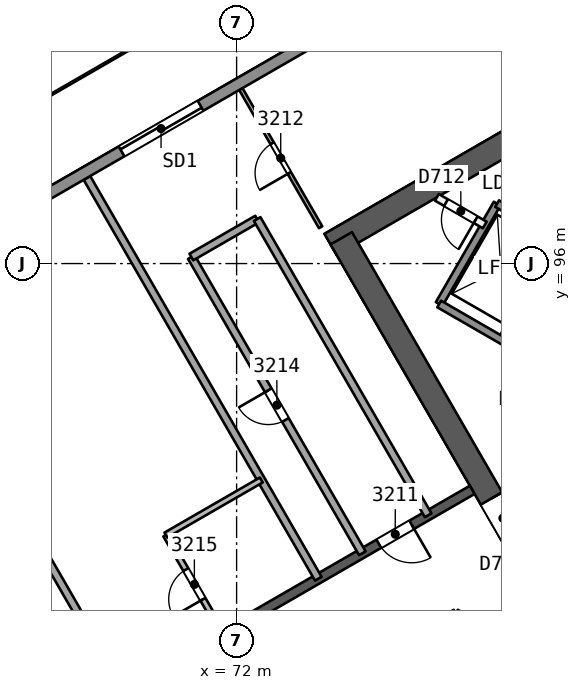
"""IFC4 building model, lengths in metres.
Left out: names, types, materials, properties, quantities, classifications, styles, units other than length and angle.
Written with IfcOpenShell. Run it as: python <this file> out.ifc"""

import sys

from ifc_helpers import new_model, si_unit, direction, frame, frame_2d, origin, place, context, subcontext, project, spatial, rectangle, extrude, element, fill, save


model = new_model("IFC4")
c1 = context("Model", 3, precision=1e-05, world=origin(), true_north=direction((0.0, 1.0)))
c2 = subcontext(c1, "Body", "Model", "MODEL_VIEW")
j1 = project(units=[si_unit("LENGTHUNIT", "METRE"), si_unit("PLANEANGLEUNIT", "RADIAN")], contexts=[c1])
p1 = place(None, origin())
s1 = spatial("IfcSite", under=j1, at=p1, CompositionType="ELEMENT")
p2 = place(p1, origin())
s2 = spatial("IfcBuilding", under=s1, at=p2, CompositionType="ELEMENT")
p3 = place(p2, frame((0.0, 0.0, 132.7)))
s3 = spatial("IfcBuildingStorey", under=s2, at=p3, CompositionType="ELEMENT", Elevation=132.7)
p4 = place(p3, frame((86.723, 103.575, 0.0), z_axis=(0.0, 0.0, 1.0), x_axis=(-0.866031824457, -0.499988878904, 0.0)))
e1 = element("IfcWall", 1, at=p4, inside=s3, PredefinedType="SHEAR", context=c2, shape_type="SweptSolid", body=[
    extrude(rectangle(XDim=14.146, YDim=0.65, at=frame_2d((7.073, 0.0))), origin(), (0.0, 0.0, 1.0), 3.7),
])
p5 = place(p3, frame((74.754, 96.665, 0.0), z_axis=(0.0, 0.0, 1.0), x_axis=(0.500011799426, -0.866018591275, 0.0)))
e2 = element("IfcWall", 2, at=p5, inside=s3, PredefinedType="SHEAR", context=c2, shape_type="SweptSolid", body=[
    extrude(rectangle(XDim=10.055, YDim=0.65, at=frame_2d((5.027, 0.0))), origin(), (0.0, 0.0, 1.0), 3.7),
])
p6 = place(p5, frame((7.905, 0.0, 0.0)))
e3 = element("IfcOpeningElement", 3, at=p6, cuts=e2, PredefinedType="OPENING", context=c2, shape_type="SweptSolid", body=[
    extrude(rectangle(XDim=1.2, YDim=2.1, at=frame_2d((0.6, 1.05))), frame((0.0, 0.335, 0.0), z_axis=(0.0, -1.0, 0.0), x_axis=(1.0, 0.0, 0.0)), (0.0, 0.0, 1.0), 0.671),
])
p7 = place(p3, frame((78.2, 90.046, 0.0), z_axis=(0.0, 0.0, 1.0), x_axis=(-0.866026492143, -0.499998114903, 0.0)))
e4 = element("IfcWall", 4, at=p7, inside=s3, PredefinedType="SHEAR", context=c2, shape_type="SweptSolid", body=[
    extrude(rectangle(XDim=15.588, YDim=0.25, at=frame_2d((7.794, 0.0))), origin(), (0.0, 0.0, 1.0), 3.25),
])
p8 = place(p7, frame((1.838, 0.0, 0.0)))
e5 = element("IfcOpeningElement", 5, at=p8, cuts=e4, PredefinedType="OPENING", context=c2, shape_type="SweptSolid", body=[
    extrude(rectangle(XDim=1.0, YDim=2.1, at=frame_2d((0.5, 1.05))), frame((0.0, 0.135, 0.0), z_axis=(0.0, -1.0, 0.0), x_axis=(1.0, 0.0, 0.0)), (0.0, 0.0, 1.0), 0.271),
])
p9 = place(p7, frame((8.538, 0.0, 0.0)))
e6 = element("IfcOpeningElement", 6, at=p9, cuts=e4, PredefinedType="OPENING", context=c2, shape_type="SweptSolid", body=[
    extrude(rectangle(XDim=1.1, YDim=2.1, at=frame_2d((0.55, 1.05))), frame((0.0, 0.135, 0.0), z_axis=(0.0, -1.0, 0.0), x_axis=(1.0, 0.0, 0.0)), (0.0, 0.0, 1.0), 0.271),
])
p10 = place(p7, frame((12.594, 0.0, 0.0)))
e7 = element("IfcOpeningElement", 7, at=p10, cuts=e4, PredefinedType="OPENING", context=c2, shape_type="SweptSolid", body=[
    extrude(rectangle(XDim=1.0, YDim=2.1, at=frame_2d((0.5, 1.05))), frame((0.0, 0.135, 0.0), z_axis=(0.0, -1.0, 0.0), x_axis=(1.0, 0.0, 0.0)), (0.0, 0.0, 1.0), 0.271),
])
p11 = place(p3, frame((74.21, 96.956, 0.0), z_axis=(0.0, 0.0, 1.0), x_axis=(-0.49999760543, 0.866026786286, 0.0)))
e8 = element("IfcWall", 8, at=p11, inside=s3, PredefinedType="PARTITIONING", context=c2, shape_type="SweptSolid", body=[
    extrude(rectangle(XDim=4.199, YDim=0.1, at=frame_2d((2.099, 0.0))), origin(), (0.0, 0.0, 1.0), 3.25),
])
p12 = place(p11, frame((1.649, 0.0, 0.0)))
e9 = element("IfcOpeningElement", 9, at=p12, cuts=e8, PredefinedType="OPENING", context=c2, shape_type="SweptSolid", body=[
    extrude(rectangle(XDim=0.9, YDim=2.1, at=frame_2d((0.45, 1.05))), frame((0.0, 0.061, 0.0), z_axis=(0.0, -1.0, 0.0), x_axis=(1.0, 0.0, 0.0)), (0.0, 0.0, 1.0), 0.121),
])
p13 = place(p3, frame((75.309, 88.377, 0.0), z_axis=(0.0, 0.0, 1.0), x_axis=(-0.5000018851, 0.866024315419, 0.0)))
e10 = element("IfcWall", 10, at=p13, inside=s3, PredefinedType="PARTITIONING", context=c2, shape_type="SweptSolid", body=[
    extrude(rectangle(XDim=9.0, YDim=0.2, at=frame_2d((4.5, 0.0))), origin(), (0.0, 0.0, 1.0), 3.25),
])
p14 = place(p13, frame((4.05, 0.0, 0.0)))
e11 = element("IfcOpeningElement", 11, at=p14, cuts=e10, PredefinedType="OPENING", context=c2, shape_type="SweptSolid", body=[
    extrude(rectangle(XDim=0.9, YDim=2.1, at=frame_2d((0.45, 1.05))), frame((0.0, 0.11, 0.0), z_axis=(0.0, -1.0, 0.0), x_axis=(1.0, 0.0, 0.0)), (0.0, 0.0, 1.0), 0.221),
])
p15 = place(p3, frame((70.809, 96.171, 0.0), z_axis=(0.0, 0.0, 1.0), x_axis=(0.866010750942, 0.50002537861, 0.0)))
e12 = element("IfcWall", 12, at=p15, inside=s3, PredefinedType="PARTITIONING", context=c2, shape_type="SweptSolid", body=[
    extrude(rectangle(XDim=2.0, YDim=0.2, at=frame_2d((1.0, 0.0))), origin(), (0.0, 0.0, 1.0), 3.25),
])
p16 = place(p3, frame((72.541, 97.171, 0.0), z_axis=(0.0, 0.0, 1.0), x_axis=(0.5000018851, -0.866024315419, 0.0)))
e13 = element("IfcWall", 13, at=p16, inside=s3, PredefinedType="PARTITIONING", context=c2, shape_type="SweptSolid", body=[
    extrude(rectangle(XDim=9.0, YDim=0.2, at=frame_2d((4.5, 0.0))), origin(), (0.0, 0.0, 1.0), 3.25),
])
p17 = place(p3, frame((68.061, 98.254, 0.0), z_axis=(0.0, 0.0, 1.0), x_axis=(0.499987977232, -0.866032345022, 0.0)))
e14 = element("IfcWall", 14, at=p17, inside=s3, PredefinedType="PARTITIONING", context=c2, shape_type="SweptSolid", body=[
    extrude(rectangle(XDim=12.177, YDim=0.2, at=frame_2d((6.089, 0.0))), origin(), (0.0, 0.0, 1.0), 3.25),
])
p18 = place(p3, frame((71.638, 86.258, 0.0), z_axis=(0.0, 0.0, 1.0), x_axis=(-0.499990139034, 0.866031096941, 0.0)))
e15 = element("IfcWall", 15, at=p18, inside=s3, PredefinedType="PARTITIONING", context=c2, shape_type="SweptSolid", body=[
    extrude(rectangle(XDim=3.0, YDim=0.15, at=frame_2d((1.5, 0.0))), origin(), (0.0, 0.0, 1.0), 3.25),
])
p19 = place(p18, frame((1.05, 0.0, 0.0)))
e16 = element("IfcOpeningElement", 16, at=p19, cuts=e15, PredefinedType="OPENING", context=c2, shape_type="SweptSolid", body=[
    extrude(rectangle(XDim=0.9, YDim=2.1, at=frame_2d((0.45, 1.05))), frame((0.0, 0.085, 0.0), z_axis=(0.0, -1.0, 0.0), x_axis=(1.0, 0.0, 0.0)), (0.0, 0.0, 1.0), 0.171),
])
p20 = place(p3, frame((70.138, 88.856, 0.0), z_axis=(0.0, 0.0, 1.0), x_axis=(0.866032775405, 0.499987231761, 0.0)))
e17 = element("IfcWall", 17, at=p20, inside=s3, PredefinedType="PARTITIONING", context=c2, shape_type="SweptSolid", body=[
    extrude(rectangle(XDim=2.9, YDim=0.15, at=frame_2d((1.45, 0.0))), origin(), (0.0, 0.0, 1.0), 3.25),
])
p21 = place(p3, frame((62.931, 95.292, 0.0), z_axis=(0.0, 0.0, 1.0), x_axis=(0.500003013575, -0.866023663889, 0.0)))
e18 = element("IfcWall", 18, at=p21, inside=s3, PredefinedType="PARTITIONING", context=c2, shape_type="SweptSolid", body=[
    extrude(rectangle(XDim=12.178, YDim=0.2, at=frame_2d((6.089, 0.0))), origin(), (0.0, 0.0, 1.0), 3.25),
])
p22 = place(p3, frame((63.226, 91.793, 0.0), z_axis=(0.0, 0.0, 1.0), x_axis=(0.5000018851, -0.866024315419, 0.0)))
e19 = element("IfcWall", 19, at=p22, inside=s3, PredefinedType="PARTITIONING", context=c2, shape_type="SweptSolid", body=[
    extrude(rectangle(XDim=9.0, YDim=0.2, at=frame_2d((4.5, 0.0))), origin(), (0.0, 0.0, 1.0), 3.25),
])
p23 = place(p22, frame((4.05, 0.0, 0.0)))
e20 = element("IfcOpeningElement", 20, at=p23, cuts=e19, PredefinedType="OPENING", context=c2, shape_type="SweptSolid", body=[
    extrude(rectangle(XDim=0.9, YDim=2.1, at=frame_2d((0.45, 1.05))), frame((0.0, 0.11, 0.0), z_axis=(0.0, -1.0, 0.0), x_axis=(1.0, 0.0, 0.0)), (0.0, 0.0, 1.0), 0.221),
])
p24 = place(p3, frame((41.097, 82.858, 0.0), z_axis=(0.0, 0.0, 1.0), x_axis=(0.866026276916, 0.499998487688, 0.0)))
e21 = element("IfcWall", 21, at=p24, inside=s3, PredefinedType="SOLIDWALL", context=c2, shape_type="SweptSolid", body=[
    extrude(rectangle(XDim=55.864, YDim=0.3, at=frame_2d((27.932, 0.0))), origin(), (0.0, 0.0, 1.0), 3.25),
])
p25 = place(p24, frame((26.888, 0.0, 0.0)))
e22 = element("IfcOpeningElement", 22, at=p25, cuts=e21, PredefinedType="OPENING", context=c2, shape_type="SweptSolid", body=[
    extrude(rectangle(XDim=2.4, YDim=2.4, at=frame_2d((1.2, 1.2))), frame((0.0, 0.161, 0.0), z_axis=(0.0, -1.0, 0.0), x_axis=(1.0, 0.0, 0.0)), (0.0, 0.0, 1.0), 0.321),
])
p26 = place(p24, frame((32.188, 0.0, 0.0)))
e23 = element("IfcOpeningElement", 23, at=p26, cuts=e21, PredefinedType="OPENING", context=c2, shape_type="SweptSolid", body=[
    extrude(rectangle(XDim=2.4, YDim=2.4, at=frame_2d((1.2, 1.2))), frame((0.0, 0.161, 0.0), z_axis=(0.0, -1.0, 0.0), x_axis=(1.0, 0.0, 0.0)), (0.0, 0.0, 1.0), 0.321),
])
p27 = place(p24, frame((43.384, 0.0, 0.0)))
e24 = element("IfcOpeningElement", 24, at=p27, cuts=e21, PredefinedType="OPENING", context=c2, shape_type="SweptSolid", body=[
    extrude(rectangle(XDim=2.4, YDim=2.4, at=frame_2d((1.2, 1.2))), frame((0.0, 0.161, 0.0), z_axis=(0.0, -1.0, 0.0), x_axis=(1.0, 0.0, 0.0)), (0.0, 0.0, 1.0), 0.321),
])
p28 = place(p24, frame((21.432, 0.0, 0.0)))
e25 = element("IfcOpeningElement", 25, at=p28, cuts=e21, PredefinedType="OPENING", context=c2, shape_type="SweptSolid", body=[
    extrude(rectangle(XDim=2.4, YDim=2.4, at=frame_2d((1.2, 1.2))), frame((0.0, 0.161, 0.0), z_axis=(0.0, -1.0, 0.0), x_axis=(1.0, 0.0, 0.0)), (0.0, 0.0, 1.0), 0.321),
])
p29 = place(p24, frame((10.029, 0.0, 0.0)))
e26 = element("IfcOpeningElement", 26, at=p29, cuts=e21, PredefinedType="OPENING", context=c2, shape_type="SweptSolid", body=[
    extrude(rectangle(XDim=2.4, YDim=2.4, at=frame_2d((1.2, 1.2))), frame((0.0, 0.161, 0.0), z_axis=(0.0, -1.0, 0.0), x_axis=(1.0, 0.0, 0.0)), (0.0, 0.0, 1.0), 0.321),
])
for number, where, z_axis, x_axis in (
    (27, (78.976, 93.986, 0.0), (0.0, 0.0, 1.0), (0.5, 0.866, 0.0)),
    (28, (77.33, 94.936, 0.0), (0.0, 0.0, 1.0), (0.5, 0.866, 0.0)),
):
    element("IfcWall", number, at=place(p3, frame(where, z_axis=z_axis, x_axis=x_axis)), inside=s3, PredefinedType="SOLIDWALL", context=c2, shape_type="SweptSolid", body=[
        extrude(rectangle(XDim=3.05, YDim=0.2, at=frame_2d((1.525, 0.0))), origin(), (0.0, 0.0, 1.0), 3.25),
    ])
p30 = place(p3, frame((86.77, 89.486, 0.0), z_axis=(0.0, 0.0, 1.0), x_axis=(-0.86601811187, 0.500012629753, 0.0)))
e29 = element("IfcWall", 29, at=p30, inside=s3, PredefinedType="SOLIDWALL", context=c2, shape_type="SweptSolid", body=[
    extrude(rectangle(XDim=10.9, YDim=0.2, at=frame_2d((5.45, 0.0))), origin(), (0.0, 0.0, 1.0), 3.25),
])
p31 = place(p30, frame((0.575, 0.0, 0.0)))
e30 = element("IfcOpeningElement", 30, at=p31, cuts=e29, PredefinedType="OPENING", context=c2, shape_type="SweptSolid", body=[
    extrude(rectangle(XDim=1.1, YDim=2.1, at=frame_2d((0.55, 1.05))), frame((0.0, 0.11, 0.0), z_axis=(0.0, -1.0, 0.0), x_axis=(1.0, 0.0, 0.0)), (0.0, 0.0, 1.0), 0.221),
])
p32 = place(p30, frame((2.825, 0.0, 0.0)))
e31 = element("IfcOpeningElement", 31, at=p32, cuts=e29, PredefinedType="OPENING", context=c2, shape_type="SweptSolid", body=[
    extrude(rectangle(XDim=1.1, YDim=2.1, at=frame_2d((0.55, 1.05))), frame((0.0, 0.11, 0.0), z_axis=(0.0, -1.0, 0.0), x_axis=(1.0, 0.0, 0.0)), (0.0, 0.0, 1.0), 0.221),
])
p33 = place(p30, frame((5.075, 0.0, 0.0)))
e32 = element("IfcOpeningElement", 32, at=p33, cuts=e29, PredefinedType="OPENING", context=c2, shape_type="SweptSolid", body=[
    extrude(rectangle(XDim=1.1, YDim=2.1, at=frame_2d((0.55, 1.05))), frame((0.0, 0.11, 0.0), z_axis=(0.0, -1.0, 0.0), x_axis=(1.0, 0.0, 0.0)), (0.0, 0.0, 1.0), 0.221),
])
p34 = place(p30, frame((7.325, 0.0, 0.0)))
e33 = element("IfcOpeningElement", 33, at=p34, cuts=e29, PredefinedType="OPENING", context=c2, shape_type="SweptSolid", body=[
    extrude(rectangle(XDim=1.1, YDim=2.1, at=frame_2d((0.55, 1.05))), frame((0.0, 0.11, 0.0), z_axis=(0.0, -1.0, 0.0), x_axis=(1.0, 0.0, 0.0)), (0.0, 0.0, 1.0), 0.221),
])
p35 = place(p3, frame((78.53, 97.014, 0.0), z_axis=(0.0, 0.0, 1.0), x_axis=(-0.866045896294, 0.499964504253, 0.0)))
e34 = element("IfcWall", 34, at=p35, inside=s3, PredefinedType="PARTITIONING", context=c2, shape_type="SweptSolid", body=[
    extrude(rectangle(XDim=1.455, YDim=0.2, at=frame_2d((0.728, 0.0))), origin(), (0.0, 0.0, 1.0), 3.25),
])
p36 = place(p35, frame((0.278, 0.0, 0.0)))
e35 = element("IfcOpeningElement", 35, at=p36, cuts=e34, PredefinedType="OPENING", context=c2, shape_type="SweptSolid", body=[
    extrude(rectangle(XDim=0.9, YDim=2.1, at=frame_2d((0.45, 1.05))), frame((0.0, 0.11, 0.0), z_axis=(0.0, -1.0, 0.0), x_axis=(1.0, 0.0, 0.0)), (0.0, 0.0, 1.0), 0.221),
])
p37 = place(p3, frame((80.5, 96.627, 0.0), z_axis=(0.0, 0.0, 1.0), x_axis=(-0.86601224135, 0.500022797313, 0.0)))
e36 = element("IfcWall", 36, at=p37, inside=s3, PredefinedType="SOLIDWALL", context=c2, shape_type="SweptSolid", body=[
    extrude(rectangle(XDim=1.9, YDim=0.2, at=frame_2d((0.95, 0.0))), origin(), (0.0, 0.0, 1.0), 3.25),
])
p38 = place(p37, frame((0.4, 0.0, 0.0)))
e37 = element("IfcOpeningElement", 37, at=p38, cuts=e36, PredefinedType="OPENING", context=c2, shape_type="SweptSolid", body=[
    extrude(rectangle(XDim=1.1, YDim=2.1, at=frame_2d((0.55, 1.05))), frame((0.0, 0.11, 0.0), z_axis=(0.0, -1.0, 0.0), x_axis=(1.0, 0.0, 0.0)), (0.0, 0.0, 1.0), 0.221),
])
p39 = place(p3, frame((79.53, 85.846, 0.0), z_axis=(0.0, 0.0, 1.0), x_axis=(-0.866041268327, 0.499972520799, 0.0)))
e38 = element("IfcWall", 38, at=p39, inside=s3, PredefinedType="PARTITIONING", context=c2, shape_type="SweptSolid", body=[
    extrude(rectangle(XDim=2.0, YDim=0.1, at=frame_2d((1.0, 0.0))), origin(), (0.0, 0.0, 1.0), 3.25),
])
p40 = place(p3, frame((77.738, 86.846, 0.0), z_axis=(0.0, 0.0, 1.0), x_axis=(-0.866026658274, -0.499997827154, 0.0)))
e39 = element("IfcWall", 39, at=p40, inside=s3, PredefinedType="PARTITIONING", context=c2, shape_type="SweptSolid", body=[
    extrude(rectangle(XDim=11.588, YDim=0.1, at=frame_2d((5.794, 0.0))), origin(), (0.0, 0.0, 1.0), 3.25),
])
p41 = place(p8, origin())
e40 = element("IfcDoor", 40, at=p41, inside=s3, OperationType="SINGLE_SWING_LEFT", PredefinedType="NOTDEFINED", context=c2, shape_type="SweptSolid", body=[
    extrude(rectangle(XDim=1.0, YDim=2.1, at=frame_2d((0.5, 1.05))), frame((0.0, 0.025, 0.0), z_axis=(0.0, -1.0, 0.0), x_axis=(1.0, 0.0, 0.0)), (0.0, 0.0, 1.0), 0.05),
])
fill(e5, e40)
p42 = place(p12, origin())
e41 = element("IfcDoor", 41, at=p42, inside=s3, OperationType="SINGLE_SWING_LEFT", PredefinedType="NOTDEFINED", context=c2, shape_type="SweptSolid", body=[
    extrude(rectangle(XDim=0.9, YDim=2.1, at=frame_2d((0.45, 1.05))), frame((0.0, 0.025, 0.0), z_axis=(0.0, -1.0, 0.0), x_axis=(1.0, 0.0, 0.0)), (0.0, 0.0, 1.0), 0.05),
])
fill(e9, e41)
p43 = place(p14, origin())
e42 = element("IfcDoor", 42, at=p43, inside=s3, OperationType="SINGLE_SWING_RIGHT", PredefinedType="NOTDEFINED", context=c2, shape_type="SweptSolid", body=[
    extrude(rectangle(XDim=0.9, YDim=2.1, at=frame_2d((0.45, 1.05))), frame((0.0, 0.025, 0.0), z_axis=(0.0, -1.0, 0.0), x_axis=(1.0, 0.0, 0.0)), (0.0, 0.0, 1.0), 0.05),
])
fill(e11, e42)
p44 = place(p19, origin())
e43 = element("IfcDoor", 43, at=p44, inside=s3, OperationType="SINGLE_SWING_LEFT", PredefinedType="NOTDEFINED", context=c2, shape_type="SweptSolid", body=[
    extrude(rectangle(XDim=0.9, YDim=2.1, at=frame_2d((0.45, 1.05))), frame((0.0, 0.025, 0.0), z_axis=(0.0, -1.0, 0.0), x_axis=(1.0, 0.0, 0.0)), (0.0, 0.0, 1.0), 0.05),
])
fill(e16, e43)
p45 = place(p26, origin())
e44 = element("IfcDoor", 44, at=p45, inside=s3, OperationType="SLIDING_TO_RIGHT", PredefinedType="NOTDEFINED", context=c2, shape_type="SweptSolid", body=[
    extrude(rectangle(XDim=2.4, YDim=2.4, at=frame_2d((1.2, 1.2))), frame((0.0, 0.025, 0.0), z_axis=(0.0, -1.0, 0.0), x_axis=(1.0, 0.0, 0.0)), (0.0, 0.0, 1.0), 0.05),
])
fill(e23, e44)
p46 = place(p6, origin())
e45 = element("IfcDoor", 45, at=p46, inside=s3, OperationType="SINGLE_SWING_LEFT", PredefinedType="NOTDEFINED", context=c2, shape_type="SweptSolid", body=[
    extrude(rectangle(XDim=1.2, YDim=2.1, at=frame_2d((0.6, 1.05))), frame((0.0, 0.025, 0.0), z_axis=(0.0, -1.0, 0.0), x_axis=(1.0, 0.0, 0.0)), (0.0, 0.0, 1.0), 0.05),
])
fill(e3, e45)
p47 = place(p36, origin())
e46 = element("IfcDoor", 46, at=p47, inside=s3, OperationType="SINGLE_SWING_LEFT", PredefinedType="NOTDEFINED", context=c2, shape_type="SweptSolid", body=[
    extrude(rectangle(XDim=0.9, YDim=2.1, at=frame_2d((0.45, 1.05))), frame((0.0, 0.025, 0.0), z_axis=(0.0, -1.0, 0.0), x_axis=(1.0, 0.0, 0.0)), (0.0, 0.0, 1.0), 0.05),
])
fill(e35, e46)
save(model, sys.argv[1])
